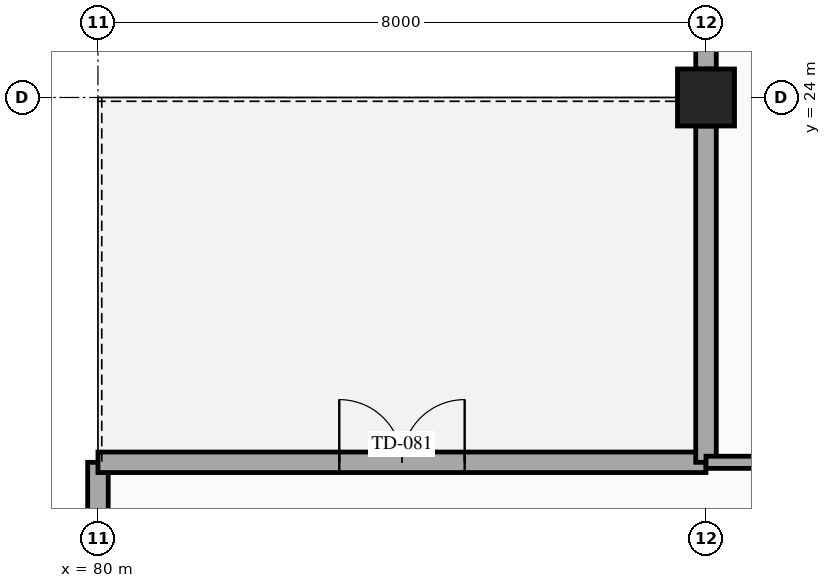
"""IFC4 building model, lengths in metres.
Left out: names, types, materials, properties, quantities, classifications, styles, units other than length and angle.
Written with IfcOpenShell. Run it as: python <this file> out.ifc"""

import sys

from ifc_helpers import new_model, si_unit, direction, frame, frame_2d, origin, origin_2d, place, context, subcontext, project, spatial, rectangle, extrude, element, fill, save


model = new_model("IFC4")
c1 = context("Model", 3, precision=1e-05, world=origin(), true_north=direction((0.0, 1.0)))
c2 = subcontext(c1, "Body", "Model", "MODEL_VIEW")
j1 = project(units=[si_unit("LENGTHUNIT", "METRE"), si_unit("PLANEANGLEUNIT", "RADIAN")], contexts=[c1])
p1 = place(None, origin())
s1 = spatial("IfcSite", under=j1, at=p1, CompositionType="ELEMENT")
p2 = place(p1, origin())
s2 = spatial("IfcBuilding", under=s1, at=p2, CompositionType="ELEMENT")
p3 = place(p2, frame((0.0, 0.0, 28.4)))
s3 = spatial("IfcBuildingStorey", under=s2, at=p3, CompositionType="ELEMENT", Elevation=28.4)
p4 = place(p3, frame((88.0, 24.0, 0.0), z_axis=(0.0, 0.0, 1.0), x_axis=(1.0, 0.0, 0.0)))
e1 = element("IfcColumn", 1, at=p4, inside=s3, PredefinedType="COLUMN", context=c2, shape_type="SweptSolid", body=[
    extrude(rectangle(XDim=0.75, YDim=0.75, at=origin_2d()), origin(), (0.0, 0.0, 1.0), 4.5),
])
p5 = place(p3, frame((80.0, 16.375, 0.0), z_axis=(0.0, 0.0, 1.0), x_axis=(0.0, 1.0, 0.0)))
e2 = element("IfcWall", 2, at=p5, inside=s3, PredefinedType="STANDARD", context=c2, shape_type="SweptSolid", body=[
    extrude(rectangle(XDim=2.825, YDim=0.27, at=frame_2d((1.413, 0.0))), origin(), (0.0, 0.0, 1.0), 3.48),
])
p6 = place(p3, frame((80.0, 19.2, 0.0), z_axis=(0.0, 0.0, 1.0), x_axis=(1.0, 0.0, 0.0)))
e3 = element("IfcWall", 3, at=p6, inside=s3, PredefinedType="STANDARD", context=c2, shape_type="SweptSolid", body=[
    extrude(rectangle(XDim=8.0, YDim=0.27, at=frame_2d((4.0, 0.0))), origin(), (0.0, 0.0, 1.0), 3.48),
])
p7 = place(p6, frame((3.175, 0.0, 0.0)))
e4 = element("IfcOpeningElement", 4, at=p7, cuts=e3, PredefinedType="OPENING", context=c2, shape_type="SweptSolid", body=[
    extrude(rectangle(XDim=1.65, YDim=2.2, at=frame_2d((0.825, 1.1))), frame((0.0, 0.145, 0.0), z_axis=(0.0, -1.0, 0.0), x_axis=(1.0, 0.0, 0.0)), (0.0, 0.0, 1.0), 0.29),
])
p8 = place(p3, frame((88.0, 19.2, 0.0), z_axis=(0.0, 0.0, 1.0), x_axis=(0.0, 1.0, 0.0)))
e5 = element("IfcWall", 5, at=p8, inside=s3, PredefinedType="STANDARD", context=c2, shape_type="SweptSolid", body=[
    extrude(rectangle(XDim=4.425, YDim=0.27, at=frame_2d((2.212, 0.0))), origin(), (0.0, 0.0, 1.0), 3.48),
])
p9 = place(p3, frame((88.0, 24.375, 0.0), z_axis=(0.0, 0.0, 1.0), x_axis=(0.0, 1.0, 0.0)))
e6 = element("IfcWall", 6, at=p9, inside=s3, PredefinedType="STANDARD", context=c2, shape_type="SweptSolid", body=[
    extrude(rectangle(XDim=7.396, YDim=0.27, at=frame_2d((3.698, 0.0))), origin(), (0.0, 0.0, 1.0), 3.48),
])
p10 = place(p9, frame((2.148, 0.0, 0.8)))
e7 = element("IfcOpeningElement", 7, at=p10, cuts=e6, PredefinedType="OPENING", context=c2, shape_type="SweptSolid", body=[
    extrude(rectangle(XDim=3.1, YDim=1.35, at=frame_2d((1.55, 0.675))), frame((0.0, 0.145, 0.0), z_axis=(0.0, -1.0, 0.0), x_axis=(1.0, 0.0, 0.0)), (0.0, 0.0, 1.0), 0.29),
])
p11 = place(p3, frame((88.0, 19.2, 0.0), z_axis=(0.0, 0.0, 1.0), x_axis=(1.0, 0.0, 0.0)))
e8 = element("IfcWall", 8, at=p11, inside=s3, PredefinedType="PARTITIONING", context=c2, shape_type="SweptSolid", body=[
    extrude(rectangle(XDim=8.0, YDim=0.16, at=frame_2d((4.0, 0.0))), origin(), (0.0, 0.0, 1.0), 3.48),
])
p12 = place(p11, frame((3.05, 0.0, 0.0)))
e9 = element("IfcOpeningElement", 9, at=p12, cuts=e8, PredefinedType="OPENING", context=c2, shape_type="SweptSolid", body=[
    extrude(rectangle(XDim=1.9, YDim=2.3, at=frame_2d((0.95, 1.15))), frame((0.0, 0.09, 0.0), z_axis=(0.0, -1.0, 0.0), x_axis=(1.0, 0.0, 0.0)), (0.0, 0.0, 1.0), 0.18),
])
p13 = place(p7, origin())
e10 = element("IfcDoor", 10, at=p13, inside=s3, OperationType="DOUBLE_DOOR_SINGLE_SWING", PredefinedType="DOOR", context=c2, shape_type="SweptSolid", body=[
    extrude(rectangle(XDim=1.65, YDim=2.2, at=frame_2d((0.825, 1.1))), frame((0.0, 0.025, 0.0), z_axis=(0.0, -1.0, 0.0), x_axis=(1.0, 0.0, 0.0)), (0.0, 0.0, 1.0), 0.05),
])
fill(e4, e10)
save(model, sys.argv[1])
